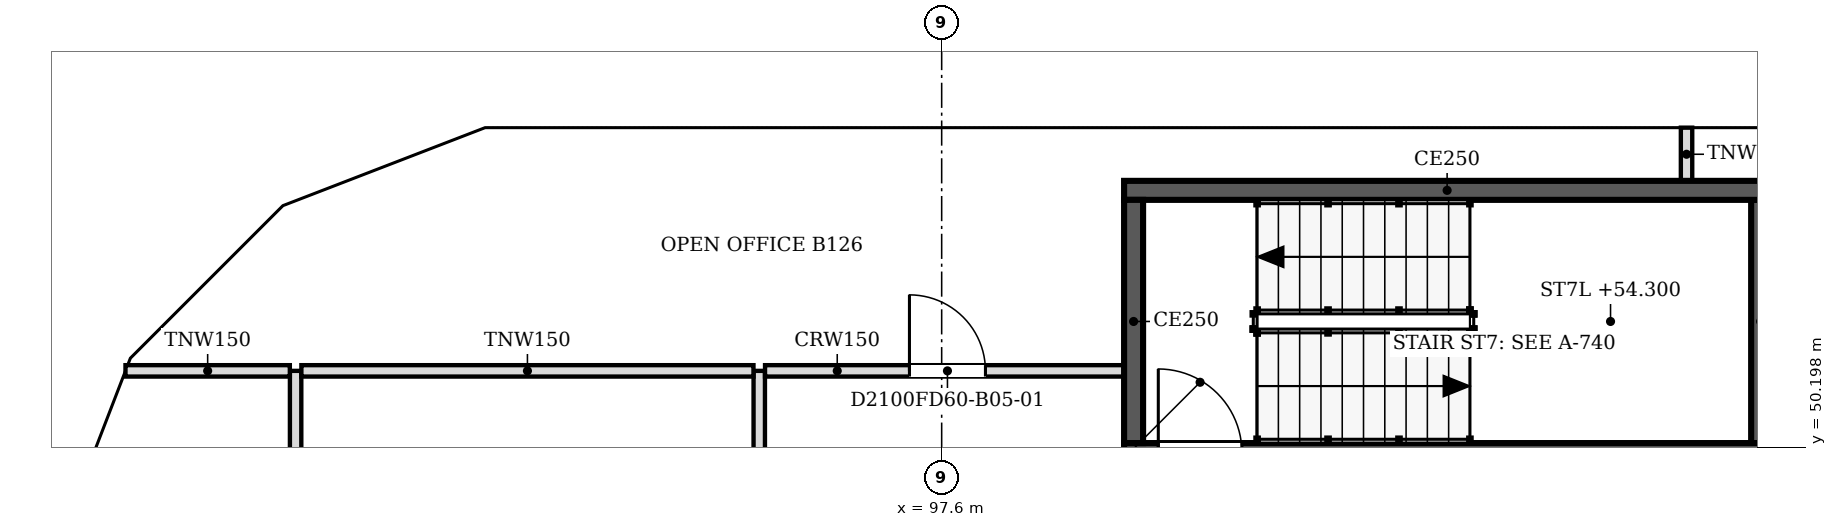
"""IFC4 building model, lengths in metres.
Left out: names, types, materials, properties, quantities, classifications, styles, units other than length and angle.
Written with IfcOpenShell. Run it as: python <this file> out.ifc"""

import sys

from ifc_helpers import new_model, si_unit, direction, frame, frame_2d, origin, place, context, subcontext, project, spatial, polyline, rectangle, outline, extrude, faceted_brep, source, transform, mapped, element, fill, save


model = new_model("IFC4")
c1 = context("Model", 3, precision=1e-05, world=origin(), true_north=direction((0.0, 1.0)))
c2 = subcontext(c1, "Body", "Model", "MODEL_VIEW")
j1 = project(units=[si_unit("LENGTHUNIT", "METRE"), si_unit("PLANEANGLEUNIT", "RADIAN")], contexts=[c1])
p1 = place(None, origin())
s1 = spatial("IfcSite", under=j1, at=p1, CompositionType="ELEMENT")
p2 = place(p1, origin())
s2 = spatial("IfcBuilding", under=s1, at=p2, CompositionType="ELEMENT")
p3 = place(p2, frame((0.0, 0.0, 52.4)))
s3 = spatial("IfcBuildingStorey", under=s2, at=p3, CompositionType="ELEMENT", Elevation=52.4)
m1 = source(origin(), c2, "Body", "SweptSolid", [
    extrude(outline(polyline([(3.05, 0.0), (6.1, 3.8), (3.05, 7.6), (0.0, 3.8), (3.05, 0.0)])), frame((0.0, 0.25, 0.0), z_axis=(0.0, -1.0, 0.0), x_axis=(1.0, 0.0, 0.0)), (0.0, 0.0, 1.0), 0.5),
])
p4 = place(p3, frame((109.8, 54.65, -3.8), z_axis=(0.0, 0.0, 1.0), x_axis=(-1.0, 0.0, 0.0)))
e1 = element("IfcWall", 1, at=p4, inside=s3, PredefinedType="SOLIDWALL", context=c2, shape_type="MappedRepresentation", body=[
    mapped(m1, transform((0.0, 0.0, 0.0), scale=1.0)),
])
m2 = source(origin(), c2, "Body", "SweptSolid", [
    extrude(outline(polyline([(3.05, 0.399), (5.78, 3.8), (3.05, 7.2), (0.321, 3.8), (3.05, 0.399)])), frame((0.0, 0.26, 0.0), z_axis=(0.0, -1.0, 0.0), x_axis=(1.0, 0.0, 0.0)), (0.0, 0.0, 1.0), 0.52),
])
p5 = place(p4, origin())
e2 = element("IfcOpeningElement", 2, at=p5, cuts=e1, PredefinedType="OPENING", context=c2, shape_type="MappedRepresentation", body=[
    mapped(m2, transform((0.0, 0.0, 0.0), scale=1.0)),
])
m3 = source(origin(), c2, "Body", "Brep", [
    faceted_brep([(3.05, -0.25, 0.0), (6.1, -0.25, 3.8), (6.1, -0.25, 3.8), (3.05, -0.25, 7.6), (0.0, -0.25, 3.8), (0.0, 0.25, 3.8), (3.05, 0.25, 7.6), (6.1, 0.25, 3.8), (6.1, 0.25, 3.8), (3.05, 0.25, 0.0)], [[[0, 1, 2, 3, 4]], [[5, 6, 7, 8, 9]], [[9, 8, 1, 0]], [[7, 6, 3, 2]], [[6, 5, 4, 3]], [[5, 9, 0, 4]], [[1, 8, 7, 2]]]),
])
p6 = place(p3, frame((103.7, 54.65, -3.8), z_axis=(0.0, 0.0, 1.0), x_axis=(-1.0, 0.0, 0.0)))
e3 = element("IfcWall", 3, at=p6, inside=s3, PredefinedType="SOLIDWALL", context=c2, shape_type="MappedRepresentation", body=[
    mapped(m3, transform((0.0, 0.0, 0.0), scale=1.0)),
])
p7 = place(p6, origin())
e4 = element("IfcOpeningElement", 4, at=p7, cuts=e3, PredefinedType="OPENING", context=c2, shape_type="MappedRepresentation", body=[
    mapped(m2, transform((0.0, 0.0, 0.0), scale=1.0)),
])
m4 = source(origin(), c2, "Body", "Brep", [
    faceted_brep([(3.05, -0.25, 0.0), (6.053, -0.25, 3.8), (3.05, -0.25, 7.6), (0.0, -0.25, 3.8), (0.0, 0.25, 3.8), (3.05, 0.25, 7.6), (6.007, 0.25, 3.859), (6.007, 0.25, 3.741), (3.05, 0.25, 0.0), (6.053, 0.0, 3.8)], [[[0, 1, 2, 3]], [[4, 5, 6, 7, 8]], [[8, 7, 9, 1, 0]], [[6, 5, 2, 1, 9]], [[5, 4, 3, 2]], [[4, 8, 0, 3]], [[9, 7, 6]]]),
])
p8 = place(p3, frame((97.6, 54.65, -3.8), z_axis=(0.0, 0.0, 1.0), x_axis=(-1.0, 0.0, 0.0)))
e5 = element("IfcWall", 5, at=p8, inside=s3, PredefinedType="SOLIDWALL", context=c2, shape_type="MappedRepresentation", body=[
    mapped(m4, transform((0.0, 0.0, 0.0), scale=1.0)),
])
m5 = source(origin(), c2, "Body", "SweptSolid", [
    extrude(outline(polyline([(3.049, 0.401), (5.735, 3.8), (3.049, 7.199), (0.321, 3.8), (3.049, 0.401)])), frame((0.0, 0.26, 0.0), z_axis=(0.0, -1.0, 0.0), x_axis=(1.0, 0.0, 0.0)), (0.0, 0.0, 1.0), 0.52),
])
p9 = place(p8, origin())
e6 = element("IfcOpeningElement", 6, at=p9, cuts=e5, PredefinedType="OPENING", context=c2, shape_type="MappedRepresentation", body=[
    mapped(m5, transform((0.0, 0.0, 0.0), scale=1.0)),
])
m6 = source(origin(), c2, "Body", "Brep", [
    faceted_brep([(2.95, -0.25, 0.0), (3.003, -0.25, 0.068), (3.003, -0.25, 7.531), (2.95, -0.25, 7.6), (0.0, -0.25, 3.8), (0.047, 0.25, 3.86), (2.898, 0.25, 7.532), (2.898, 0.25, 0.068), (0.047, 0.25, 3.74), (2.95, 0.0, 0.0), (2.95, 0.0, 7.6), (0.0, 0.0, 3.8)], [[[0, 1, 2, 3, 4]], [[5, 6, 7, 8]], [[1, 0, 9]], [[10, 3, 2]], [[6, 5, 11, 4, 3, 10]], [[8, 7, 9, 0, 4, 11]], [[8, 11, 5]], [[1, 9, 7, 6, 10, 2]]]),
])
p10 = place(p3, frame((91.547, 54.65, -3.8), z_axis=(0.0, 0.0, 1.0), x_axis=(-0.933007896601, -0.359855894603, 0.0)))
e7 = element("IfcWall", 7, at=p10, inside=s3, PredefinedType="SOLIDWALL", context=c2, shape_type="MappedRepresentation", body=[
    mapped(m6, transform((0.0, 0.0, 0.0), scale=1.0)),
])
m7 = source(origin(), c2, "Body", "SweptSolid", [
    extrude(outline(polyline([(2.75, 6.935), (0.316, 3.8), (2.75, 0.665), (2.75, 6.935)])), frame((0.0, 0.26, 0.0), z_axis=(0.0, -1.0, 0.0), x_axis=(1.0, 0.0, 0.0)), (0.0, 0.0, 1.0), 0.52),
])
p11 = place(p10, origin())
e8 = element("IfcOpeningElement", 8, at=p11, cuts=e7, PredefinedType="OPENING", context=c2, shape_type="MappedRepresentation", body=[
    mapped(m7, transform((0.0, 0.0, 0.0), scale=1.0)),
])
m8 = source(origin(), c2, "Body", "Brep", [
    faceted_brep([(0.053, -0.25, 0.0), (2.997, -0.25, 3.8), (0.053, -0.25, 7.6), (0.0, -0.25, 7.532), (0.0, -0.25, 0.068), (0.106, 0.25, 7.531), (2.944, 0.25, 3.868), (2.944, 0.25, 3.732), (0.106, 0.25, 0.068), (2.997, 0.0, 3.8), (0.053, 0.0, 0.0), (0.053, 0.0, 7.6)], [[[0, 1, 2, 3, 4]], [[5, 6, 7, 8]], [[8, 7, 9, 1, 0, 10]], [[6, 5, 11, 2, 1, 9]], [[3, 2, 11]], [[10, 0, 4]], [[8, 10, 4, 3, 11, 5]], [[9, 7, 6]]]),
])
p12 = place(p3, frame((88.831, 53.625, -3.8), z_axis=(0.0, 0.0, 1.0), x_axis=(-0.707147509625, -0.707066050402, 0.0)))
e9 = element("IfcWall", 9, at=p12, inside=s3, PredefinedType="SOLIDWALL", context=c2, shape_type="MappedRepresentation", body=[
    mapped(m8, transform((0.0, 0.0, 0.0), scale=1.0)),
])
m9 = source(origin(), c2, "Body", "SweptSolid", [
    extrude(outline(polyline([(0.253, 0.666), (2.681, 3.8), (0.253, 6.934), (0.253, 0.666)])), frame((0.0, 0.26, 0.0), z_axis=(0.0, -1.0, 0.0), x_axis=(1.0, 0.0, 0.0)), (0.0, 0.0, 1.0), 0.52),
])
p13 = place(p12, origin())
e10 = element("IfcOpeningElement", 10, at=p13, cuts=e9, PredefinedType="OPENING", context=c2, shape_type="MappedRepresentation", body=[
    mapped(m9, transform((0.0, 0.0, 0.0), scale=1.0)),
])
m10 = source(origin(), c2, "Body", "Brep", [
    faceted_brep([(2.95, -0.25, 0.0), (2.997, -0.25, 0.059), (2.997, -0.25, 7.541), (2.95, -0.25, 7.6), (0.0, -0.25, 3.8), (0.053, 0.25, 3.868), (2.904, 0.25, 7.54), (2.904, 0.25, 0.06), (0.053, 0.25, 3.732), (2.95, 0.0, 0.0), (2.95, 0.0, 7.6), (0.0, 0.0, 3.8)], [[[0, 1, 2, 3, 4]], [[5, 6, 7, 8]], [[1, 0, 9]], [[10, 3, 2]], [[6, 5, 11, 4, 3, 10]], [[8, 7, 9, 0, 4, 11]], [[8, 11, 5]], [[1, 9, 7, 6, 10, 2]]]),
])
p14 = place(p3, frame((86.712, 51.506, -3.8), z_axis=(0.0, 0.0, 1.0), x_axis=(-0.359874094142, -0.933000876937, 0.0)))
e11 = element("IfcWall", 11, at=p14, inside=s3, PredefinedType="SOLIDWALL", context=c2, shape_type="MappedRepresentation", body=[
    mapped(m10, transform((0.0, 0.0, 0.0), scale=1.0)),
])
p15 = place(p14, origin())
e12 = element("IfcOpeningElement", 12, at=p15, cuts=e11, PredefinedType="OPENING", context=c2, shape_type="MappedRepresentation", body=[
    mapped(m7, transform((0.0, 0.0, 0.0), scale=1.0)),
])
p16 = place(p2, frame((0.0, 0.0, 56.2)))
s4 = spatial("IfcBuildingStorey", under=s2, at=p16, CompositionType="ELEMENT", Elevation=56.2)
m11 = source(origin(), c2, "Body", "SweptSolid", [
    extrude(outline(polyline([(3.05, 0.0), (6.1, 3.8), (3.05, 7.6), (0.0, 3.8), (3.05, 0.0)])), frame((0.0, 0.25, 0.0), z_axis=(0.0, -1.0, 0.0), x_axis=(1.0, 0.0, 0.0)), (0.0, 0.0, 1.0), 0.5),
])
p17 = place(p16, frame((112.85, 54.65, -3.8), z_axis=(0.0, 0.0, 1.0), x_axis=(-1.0, 0.0, 0.0)))
e13 = element("IfcWall", 13, at=p17, inside=s4, PredefinedType="SOLIDWALL", context=c2, shape_type="MappedRepresentation", body=[
    mapped(m11, transform((0.0, 0.0, 0.0), scale=1.0)),
])
m12 = source(origin(), c2, "Body", "SweptSolid", [
    extrude(outline(polyline([(3.05, 0.399), (5.78, 3.8), (3.05, 7.201), (0.321, 3.8), (3.05, 0.399)])), frame((0.0, 0.26, 0.0), z_axis=(0.0, -1.0, 0.0), x_axis=(1.0, 0.0, 0.0)), (0.0, 0.0, 1.0), 0.52),
])
p18 = place(p17, origin())
e14 = element("IfcOpeningElement", 14, at=p18, cuts=e13, PredefinedType="OPENING", context=c2, shape_type="MappedRepresentation", body=[
    mapped(m12, transform((0.0, 0.0, 0.0), scale=1.0)),
])
p19 = place(p16, frame((106.75, 54.65, -3.8), z_axis=(0.0, 0.0, 1.0), x_axis=(-1.0, 0.0, 0.0)))
e15 = element("IfcWall", 15, at=p19, inside=s4, PredefinedType="SOLIDWALL", context=c2, shape_type="MappedRepresentation", body=[
    mapped(m11, transform((0.0, 0.0, 0.0), scale=1.0)),
])
p20 = place(p19, origin())
e16 = element("IfcOpeningElement", 16, at=p20, cuts=e15, PredefinedType="OPENING", context=c2, shape_type="MappedRepresentation", body=[
    mapped(m12, transform((0.0, 0.0, 0.0), scale=1.0)),
])
m13 = source(origin(), c2, "Body", "Brep", [
    faceted_brep([(3.05, -0.25, 0.0), (6.1, -0.25, 3.8), (6.1, -0.25, 3.8), (3.05, -0.25, 7.6), (0.0, -0.25, 3.8), (0.0, 0.25, 3.8), (3.05, 0.25, 7.6), (6.1, 0.25, 3.8), (6.1, 0.25, 3.8), (3.05, 0.25, 0.0)], [[[0, 1, 2, 3, 4]], [[5, 6, 7, 8, 9]], [[9, 8, 1, 0]], [[7, 6, 3, 2]], [[6, 5, 4, 3]], [[5, 9, 0, 4]], [[1, 8, 7, 2]]]),
])
p21 = place(p16, frame((100.65, 54.65, -3.8), z_axis=(0.0, 0.0, 1.0), x_axis=(-1.0, 0.0, 0.0)))
e17 = element("IfcWall", 17, at=p21, inside=s4, PredefinedType="SOLIDWALL", context=c2, shape_type="MappedRepresentation", body=[
    mapped(m13, transform((0.0, 0.0, 0.0), scale=1.0)),
])
p22 = place(p21, origin())
e18 = element("IfcOpeningElement", 18, at=p22, cuts=e17, PredefinedType="OPENING", context=c2, shape_type="MappedRepresentation", body=[
    mapped(m12, transform((0.0, 0.0, 0.0), scale=1.0)),
])
m14 = source(origin(), c2, "Body", "Brep", [
    faceted_brep([(3.003, -0.25, 0.0), (3.05, -0.25, 0.06), (3.05, -0.25, 7.54), (3.003, -0.25, 7.6), (0.0, -0.25, 3.8), (0.0, 0.25, 3.8), (2.957, 0.25, 7.541), (2.957, 0.25, 0.059), (3.003, 0.0, 0.0), (3.003, 0.0, 7.6)], [[[0, 1, 2, 3, 4]], [[5, 6, 7]], [[1, 0, 8]], [[9, 3, 2]], [[6, 5, 4, 3, 9]], [[5, 7, 8, 0, 4]], [[1, 8, 7, 6, 9, 2]]]),
])
p23 = place(p16, frame((94.55, 54.65, -3.8), z_axis=(0.0, 0.0, 1.0), x_axis=(-1.0, 0.0, 0.0)))
e19 = element("IfcWall", 19, at=p23, inside=s4, PredefinedType="SOLIDWALL", context=c2, shape_type="MappedRepresentation", body=[
    mapped(m14, transform((0.0, 0.0, 0.0), scale=1.0)),
])
m15 = source(origin(), c2, "Body", "SweptSolid", [
    extrude(outline(polyline([(2.803, 6.944), (0.319, 3.8), (2.803, 0.656), (2.803, 6.944)])), frame((0.0, 0.26, 0.0), z_axis=(0.0, -1.0, 0.0), x_axis=(1.0, 0.0, 0.0)), (0.0, 0.0, 1.0), 0.52),
])
p24 = place(p23, origin())
e20 = element("IfcOpeningElement", 20, at=p24, cuts=e19, PredefinedType="OPENING", context=c2, shape_type="MappedRepresentation", body=[
    mapped(m15, transform((0.0, 0.0, 0.0), scale=1.0)),
])
m16 = source(origin(), c2, "Body", "Brep", [
    faceted_brep([(0.047, -0.25, 0.0), (2.997, -0.25, 3.8), (0.047, -0.25, 7.6), (0.0, -0.25, 7.541), (0.0, -0.25, 0.059), (0.093, 0.25, 7.54), (2.944, 0.25, 3.868), (2.944, 0.25, 3.732), (0.093, 0.25, 0.06), (2.997, 0.0, 3.8), (0.047, 0.0, 0.0), (0.047, 0.0, 7.6)], [[[0, 1, 2, 3, 4]], [[5, 6, 7, 8]], [[8, 7, 9, 1, 0, 10]], [[6, 5, 11, 2, 1, 9]], [[3, 2, 11]], [[10, 0, 4]], [[8, 10, 4, 3, 11, 5]], [[9, 7, 6]]]),
])
p25 = place(p16, frame((91.59, 54.667, -3.8), z_axis=(0.0, 0.0, 1.0), x_axis=(-0.933000876937, -0.359874094142, 0.0)))
e21 = element("IfcWall", 21, at=p25, inside=s4, PredefinedType="SOLIDWALL", context=c2, shape_type="MappedRepresentation", body=[
    mapped(m16, transform((0.0, 0.0, 0.0), scale=1.0)),
])
m17 = source(origin(), c2, "Body", "SweptSolid", [
    extrude(outline(polyline([(0.247, 0.665), (2.681, 3.8), (0.247, 6.935), (0.247, 0.665)])), frame((0.0, 0.26, 0.0), z_axis=(0.0, -1.0, 0.0), x_axis=(1.0, 0.0, 0.0)), (0.0, 0.0, 1.0), 0.52),
])
p26 = place(p25, origin())
e22 = element("IfcOpeningElement", 22, at=p26, cuts=e21, PredefinedType="OPENING", context=c2, shape_type="MappedRepresentation", body=[
    mapped(m17, transform((0.0, 0.0, 0.0), scale=1.0)),
])
m18 = source(origin(), c2, "Body", "Brep", [
    faceted_brep([(2.944, -0.25, 0.0), (2.997, -0.25, 0.068), (2.997, -0.25, 7.532), (2.944, -0.25, 7.6), (0.0, -0.25, 3.8), (0.053, 0.25, 3.868), (2.891, 0.25, 7.532), (2.891, 0.25, 0.068), (0.053, 0.25, 3.732), (2.944, 0.0, 0.0), (2.944, 0.0, 7.6), (0.0, 0.0, 3.8)], [[[0, 1, 2, 3, 4]], [[5, 6, 7, 8]], [[1, 0, 9]], [[10, 3, 2]], [[6, 5, 11, 4, 3, 10]], [[8, 7, 9, 0, 4, 11]], [[8, 11, 5]], [[1, 9, 7, 6, 10, 2]]]),
])
p27 = place(p16, frame((88.794, 53.588, -3.8), z_axis=(0.0, 0.0, 1.0), x_axis=(-0.707066050402, -0.707147509625, 0.0)))
e23 = element("IfcWall", 23, at=p27, inside=s4, PredefinedType="SOLIDWALL", context=c2, shape_type="MappedRepresentation", body=[
    mapped(m18, transform((0.0, 0.0, 0.0), scale=1.0)),
])
m19 = source(origin(), c2, "Body", "SweptSolid", [
    extrude(outline(polyline([(2.744, 6.934), (0.316, 3.8), (2.744, 0.667), (2.744, 6.934)])), frame((0.0, 0.26, 0.0), z_axis=(0.0, -1.0, 0.0), x_axis=(1.0, 0.0, 0.0)), (0.0, 0.0, 1.0), 0.52),
])
p28 = place(p27, origin())
e24 = element("IfcOpeningElement", 24, at=p28, cuts=e23, PredefinedType="OPENING", context=c2, shape_type="MappedRepresentation", body=[
    mapped(m19, transform((0.0, 0.0, 0.0), scale=1.0)),
])
m20 = source(origin(), c2, "Body", "Brep", [
    faceted_brep([(0.053, -0.25, 0.0), (3.003, -0.25, 3.8), (0.053, -0.25, 7.6), (0.0, -0.25, 7.532), (0.0, -0.25, 0.068), (0.106, 0.25, 7.532), (2.957, 0.25, 3.86), (2.957, 0.25, 3.74), (0.106, 0.25, 0.068), (3.003, 0.0, 3.8), (0.053, 0.0, 0.0), (0.053, 0.0, 7.6)], [[[0, 1, 2, 3, 4]], [[5, 6, 7, 8]], [[8, 7, 9, 1, 0, 10]], [[6, 5, 11, 2, 1, 9]], [[3, 2, 11]], [[10, 0, 4]], [[8, 10, 4, 3, 11, 5]], [[9, 7, 6]]]),
])
p29 = place(p16, frame((86.731, 51.556, -3.8), z_axis=(0.0, 0.0, 1.0), x_axis=(-0.359855894603, -0.933007896601, 0.0)))
e25 = element("IfcWall", 25, at=p29, inside=s4, PredefinedType="SOLIDWALL", context=c2, shape_type="MappedRepresentation", body=[
    mapped(m20, transform((0.0, 0.0, 0.0), scale=1.0)),
])
m21 = source(origin(), c2, "Body", "SweptSolid", [
    extrude(outline(polyline([(0.253, 0.665), (2.687, 3.8), (0.253, 6.935), (0.253, 0.665)])), frame((0.0, 0.26, 0.0), z_axis=(0.0, -1.0, 0.0), x_axis=(1.0, 0.0, 0.0)), (0.0, 0.0, 1.0), 0.52),
])
p30 = place(p29, origin())
e26 = element("IfcOpeningElement", 26, at=p30, cuts=e25, PredefinedType="OPENING", context=c2, shape_type="MappedRepresentation", body=[
    mapped(m21, transform((0.0, 0.0, 0.0), scale=1.0)),
])
p31 = place(p3, frame((108.5, 50.125, 0.0), z_axis=(0.0, 0.0, 1.0), x_axis=(-1.0, 0.0, 0.0)))
e27 = element("IfcWall", 27, at=p31, inside=s3, PredefinedType="SOLIDWALL", context=c2, shape_type="SweptSolid", body=[
    extrude(rectangle(XDim=8.5, YDim=0.25, at=frame_2d((4.25, 0.0))), origin(), (0.0, 0.0, 1.0), 3.8),
])
m22 = source(origin(), c2, "Body", "SweptSolid", [
    extrude(rectangle(XDim=1.1, YDim=2.1, at=frame_2d((0.55, 1.05))), frame((0.0, 0.135, 0.0), z_axis=(0.0, -1.0, 0.0), x_axis=(1.0, 0.0, 0.0)), (0.0, 0.0, 1.0), 0.27),
])
p32 = place(p31, frame((6.95, 0.0, 0.0)))
e28 = element("IfcOpeningElement", 28, at=p32, cuts=e27, PredefinedType="OPENING", context=c2, shape_type="MappedRepresentation", body=[
    mapped(m22, transform((0.0, 0.0, 0.0), scale=1.0)),
])
p33 = place(p3, frame((100.125, 50.25, 0.0), z_axis=(0.0, 0.0, 1.0), x_axis=(0.0, 1.0, 0.0)))
e29 = element("IfcWall", 29, at=p33, inside=s3, PredefinedType="SOLIDWALL", context=c2, shape_type="SweptSolid", body=[
    extrude(rectangle(XDim=3.2, YDim=0.25, at=frame_2d((1.6, 0.0))), origin(), (0.0, 0.0, 1.0), 3.8),
])
p34 = place(p3, frame((100.0, 53.575, 0.0), z_axis=(0.0, 0.0, 1.0), x_axis=(1.0, 0.0, 0.0)))
e30 = element("IfcWall", 30, at=p34, inside=s3, PredefinedType="SOLIDWALL", context=c2, shape_type="SweptSolid", body=[
    extrude(rectangle(XDim=8.5, YDim=0.25, at=frame_2d((4.25, 0.0))), origin(), (0.0, 0.0, 1.0), 3.8),
])
p35 = place(p3, frame((108.375, 53.45, 0.0), z_axis=(0.0, 0.0, 1.0), x_axis=(0.0, -1.0, 0.0)))
e31 = element("IfcWall", 31, at=p35, inside=s3, PredefinedType="SOLIDWALL", context=c2, shape_type="SweptSolid", body=[
    extrude(rectangle(XDim=3.2, YDim=0.25, at=frame_2d((1.6, 0.0))), origin(), (0.0, 0.0, 1.0), 3.8),
])
p36 = place(p3, frame((95.2, 36.6, 0.0), z_axis=(0.0, 0.0, 1.0), x_axis=(0.0, 1.0, 0.0)))
e32 = element("IfcWall", 32, at=p36, inside=s3, PredefinedType="PARTITIONING", context=c2, shape_type="SweptSolid", body=[
    extrude(rectangle(XDim=14.6, YDim=0.15, at=frame_2d((7.3, 0.0))), origin(), (0.0, 0.0, 1.0), 3.067),
])
m23 = source(origin(), c2, "Body", "SweptSolid", [
    extrude(rectangle(XDim=1.8, YDim=2.1, at=frame_2d((0.9, 1.05))), frame((0.0, 0.085, 0.0), z_axis=(0.0, -1.0, 0.0), x_axis=(1.0, 0.0, 0.0)), (0.0, 0.0, 1.0), 0.17),
])
p37 = place(p36, frame((9.4, 0.0, 0.0)))
e33 = element("IfcOpeningElement", 33, at=p37, cuts=e32, PredefinedType="OPENING", context=c2, shape_type="MappedRepresentation", body=[
    mapped(m23, transform((0.0, 0.0, 0.0), scale=1.0)),
])
p38 = place(p3, frame((89.1, 42.6, 0.0), z_axis=(0.0, 0.0, 1.0), x_axis=(0.0, 1.0, 0.0)))
e34 = element("IfcWall", 34, at=p38, inside=s3, PredefinedType="PARTITIONING", context=c2, shape_type="SweptSolid", body=[
    extrude(rectangle(XDim=8.6, YDim=0.15, at=frame_2d((4.3, 0.0))), origin(), (0.0, 0.0, 1.0), 3.067),
])
m24 = source(origin(), c2, "Body", "SweptSolid", [
    extrude(rectangle(XDim=0.9, YDim=2.1, at=frame_2d((0.45, 1.05))), frame((0.0, 0.085, 0.0), z_axis=(0.0, -1.0, 0.0), x_axis=(1.0, 0.0, 0.0)), (0.0, 0.0, 1.0), 0.17),
])
p39 = place(p38, frame((3.8, 0.0, 0.0)))
e35 = element("IfcOpeningElement", 35, at=p39, cuts=e34, PredefinedType="OPENING", context=c2, shape_type="MappedRepresentation", body=[
    mapped(m24, transform((0.0, 0.0, 0.0), scale=1.0)),
])
p40 = place(p3, frame((86.862, 51.2, 0.0), z_axis=(0.0, 0.0, 1.0), x_axis=(1.0, 0.0, 0.0)))
e36 = element("IfcWall", 36, at=p40, inside=s3, PredefinedType="PARTITIONING", context=c2, shape_type="SweptSolid", body=[
    extrude(rectangle(XDim=2.162, YDim=0.15, at=frame_2d((1.081, 0.0))), origin(), (0.0, 0.0, 1.0), 3.067),
])
p41 = place(p3, frame((89.176, 51.2, 0.0), z_axis=(0.0, 0.0, 1.0), x_axis=(1.0, 0.0, 0.0)))
e37 = element("IfcWall", 37, at=p41, inside=s3, PredefinedType="PARTITIONING", context=c2, shape_type="SweptSolid", body=[
    extrude(rectangle(XDim=5.948, YDim=0.15, at=frame_2d((2.974, 0.0))), origin(), (0.0, 0.0, 1.0), 3.067),
])
p42 = place(p3, frame((95.276, 51.2, 0.0), z_axis=(0.0, 0.0, 1.0), x_axis=(1.0, 0.0, 0.0)))
e38 = element("IfcWall", 38, at=p42, inside=s3, PredefinedType="PARTITIONING", context=c2, shape_type="SweptSolid", body=[
    extrude(rectangle(XDim=4.724, YDim=0.15, at=frame_2d((2.362, 0.0))), origin(), (0.0, 0.0, 1.0), 3.067),
])
m25 = source(origin(), c2, "Body", "SweptSolid", [
    extrude(rectangle(XDim=1.0, YDim=2.1, at=frame_2d((0.5, 1.05))), frame((0.0, 0.085, 0.0), z_axis=(0.0, -1.0, 0.0), x_axis=(1.0, 0.0, 0.0)), (0.0, 0.0, 1.0), 0.17),
])
p43 = place(p42, frame((1.9, 0.0, 0.0)))
e39 = element("IfcOpeningElement", 39, at=p43, cuts=e38, PredefinedType="OPENING", context=c2, shape_type="MappedRepresentation", body=[
    mapped(m25, transform((0.0, 0.0, 0.0), scale=1.0)),
])
p44 = place(p3, frame((107.4, 53.7, 0.0), z_axis=(0.0, 0.0, 1.0), x_axis=(0.0, 1.0, 0.0)))
e40 = element("IfcWall", 40, at=p44, inside=s3, PredefinedType="PARTITIONING", context=c2, shape_type="SweptSolid", body=[
    extrude(rectangle(XDim=0.7, YDim=0.15, at=frame_2d((0.35, 0.0))), origin(), (0.0, 0.0, 1.0), 3.067),
])
m26 = source(origin(), c2, "Body", "SweptSolid", [
    extrude(rectangle(XDim=1.0, YDim=2.1, at=frame_2d((0.5, 1.05))), frame((0.0, 0.025, 0.0), z_axis=(0.0, -1.0, 0.0), x_axis=(1.0, 0.0, 0.0)), (0.0, 0.0, 1.0), 0.05),
])
p45 = place(p43, origin())
e41 = element("IfcDoor", 41, at=p45, inside=s3, OperationType="SINGLE_SWING_LEFT", PredefinedType="DOOR", context=c2, shape_type="MappedRepresentation", body=[
    mapped(m26, transform((0.0, 0.0, 0.0), scale=1.0)),
])
fill(e39, e41)
save(model, sys.argv[1])
